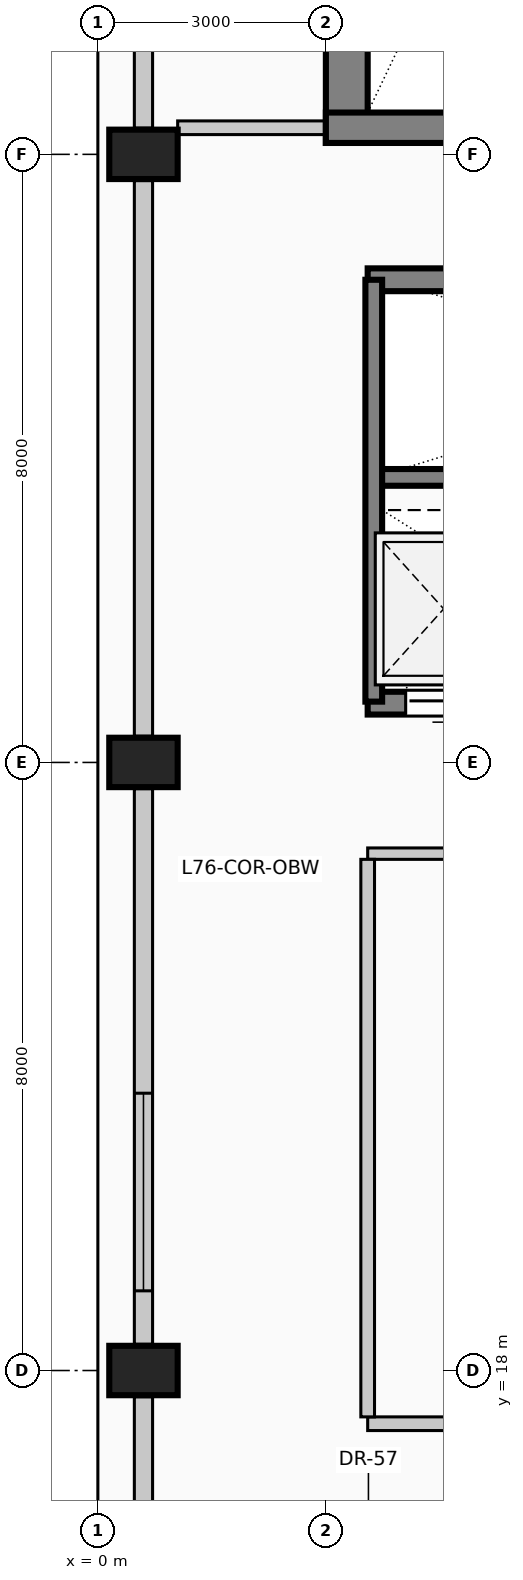
"""IFC4 building model, lengths in metres.
Left out: names, types, materials, properties, quantities, classifications, styles, units other than length and angle.
Written with IfcOpenShell. Run it as: python <this file> out.ifc"""

import sys

from ifc_helpers import new_model, si_unit, direction, frame, frame_2d, origin, origin_2d, place, context, subcontext, project, spatial, rectangle, extrude, element, fill, save


model = new_model("IFC4")
c1 = context("Model", 3, precision=1e-05, world=origin(), true_north=direction((0.0, 1.0)))
c2 = subcontext(c1, "Body", "Model", "MODEL_VIEW")
j1 = project(units=[si_unit("LENGTHUNIT", "METRE"), si_unit("PLANEANGLEUNIT", "RADIAN")], contexts=[c1])
p1 = place(None, origin())
s1 = spatial("IfcSite", under=j1, at=p1, CompositionType="ELEMENT")
p2 = place(p1, origin())
s2 = spatial("IfcBuilding", under=s1, at=p2, CompositionType="ELEMENT")
p3 = place(p2, frame((0.0, 0.0, 313.0)))
s3 = spatial("IfcBuildingStorey", under=s2, at=p3, CompositionType="ELEMENT", Elevation=313.0)
p4 = place(p3, frame((3.275, 34.15, 0.0), z_axis=(0.0, 0.0, 1.0), x_axis=(0.0, 1.0, 0.0)))
e1 = element("IfcWall", 1, at=p4, inside=s3, PredefinedType="SHEAR", context=c2, shape_type="SweptSolid", body=[
    extrude(rectangle(XDim=8.83, YDim=0.55, at=frame_2d((4.415, 0.0))), origin(), (0.0, 0.0, 1.0), 4.8),
])
p5 = place(p3, frame((3.0, 34.35, 0.0), z_axis=(0.0, 0.0, 1.0), x_axis=(1.0, 0.0, 0.0)))
e2 = element("IfcWall", 2, at=p5, inside=s3, PredefinedType="SHEAR", context=c2, shape_type="SweptSolid", body=[
    extrude(rectangle(XDim=4.71, YDim=0.4, at=frame_2d((2.355, 0.0))), origin(), (0.0, 0.0, 1.0), 4.8),
])
p6 = place(p5, frame((2.4, 0.0, 0.0)))
e3 = element("IfcOpeningElement", 3, at=p6, cuts=e2, PredefinedType="OPENING", context=c2, shape_type="SweptSolid", body=[
    extrude(rectangle(XDim=1.15, YDim=2.2, at=frame_2d((0.575, 1.1))), frame((0.0, 0.21, 0.0), z_axis=(0.0, -1.0, 0.0), x_axis=(1.0, 0.0, 0.0)), (0.0, 0.0, 1.0), 0.42),
])
for number, where, z_axis, x_axis in (
    (4, (0.6, 18.0, 0.0), (0.0, 0.0, 1.0), (0.0, 1.0, 0.0)),
    (5, (0.6, 26.0, 0.0), (0.0, 0.0, 1.0), (0.0, 1.0, 0.0)),
    (6, (0.6, 34.0, 0.0), (0.0, 0.0, 1.0), (0.0, 1.0, 0.0)),
):
    element("IfcColumn", number, at=place(p3, frame(where, z_axis=z_axis, x_axis=x_axis)), inside=s3, PredefinedType="COLUMN", context=c2, shape_type="SweptSolid", body=[
        extrude(rectangle(XDim=0.65, YDim=0.9, at=origin_2d()), origin(), (0.0, 0.0, 1.0), 4.8),
    ])
p7 = place(p3, frame((0.6, 10.345, 0.0), z_axis=(0.0, 0.0, 1.0), x_axis=(0.0, 1.0, 0.0)))
e7 = element("IfcWall", 7, at=p7, inside=s3, PredefinedType="SOLIDWALL", context=c2, shape_type="SweptSolid", body=[
    extrude(rectangle(XDim=7.31, YDim=0.24, at=frame_2d((3.655, 0.0))), origin(), (0.0, 0.0, 1.0), 3.71),
])
p8 = place(p7, frame((0.703, 0.0, 0.35)))
e8 = element("IfcOpeningElement", 8, at=p8, cuts=e7, PredefinedType="OPENING", context=c2, shape_type="SweptSolid", body=[
    extrude(rectangle(XDim=2.6, YDim=2.4, at=frame_2d((1.3, 1.2))), frame((0.0, 0.13, 0.0), z_axis=(0.0, -1.0, 0.0), x_axis=(1.0, 0.0, 0.0)), (0.0, 0.0, 1.0), 0.26),
])
p9 = place(p3, frame((0.6, 18.345, 0.0), z_axis=(0.0, 0.0, 1.0), x_axis=(0.0, 1.0, 0.0)))
e9 = element("IfcWall", 9, at=p9, inside=s3, PredefinedType="SOLIDWALL", context=c2, shape_type="SweptSolid", body=[
    extrude(rectangle(XDim=7.31, YDim=0.24, at=frame_2d((3.655, 0.0))), origin(), (0.0, 0.0, 1.0), 3.71),
])
p10 = place(p9, frame((0.703, 0.0, 0.35)))
e10 = element("IfcOpeningElement", 10, at=p10, cuts=e9, PredefinedType="OPENING", context=c2, shape_type="SweptSolid", body=[
    extrude(rectangle(XDim=2.6, YDim=2.4, at=frame_2d((1.3, 1.2))), frame((0.0, 0.13, 0.0), z_axis=(0.0, -1.0, 0.0), x_axis=(1.0, 0.0, 0.0)), (0.0, 0.0, 1.0), 0.26),
])
p11 = place(p3, frame((0.6, 26.345, 0.0), z_axis=(0.0, 0.0, 1.0), x_axis=(0.0, 1.0, 0.0)))
e11 = element("IfcWall", 11, at=p11, inside=s3, PredefinedType="SOLIDWALL", context=c2, shape_type="SweptSolid", body=[
    extrude(rectangle(XDim=7.31, YDim=0.24, at=frame_2d((3.655, 0.0))), origin(), (0.0, 0.0, 1.0), 3.71),
])
p12 = place(p3, frame((0.6, 34.345, 0.0), z_axis=(0.0, 0.0, 1.0), x_axis=(0.0, 1.0, 0.0)))
e12 = element("IfcWall", 12, at=p12, inside=s3, PredefinedType="SOLIDWALL", context=c2, shape_type="SweptSolid", body=[
    extrude(rectangle(XDim=7.71, YDim=0.24, at=frame_2d((3.855, 0.0))), origin(), (0.0, 0.0, 1.0), 3.71),
])
p13 = place(p3, frame((3.55, 32.35, 0.0), z_axis=(0.0, 0.0, 1.0), x_axis=(1.0, 0.0, 0.0)))
e13 = element("IfcWall", 13, at=p13, inside=s3, PredefinedType="SOLIDWALL", context=c2, shape_type="SweptSolid", body=[
    extrude(rectangle(XDim=2.1, YDim=0.3, at=frame_2d((1.05, 0.0))), origin(), (0.0, 0.0, 1.0), 4.8),
])
p14 = place(p3, frame((5.65, 26.78, 0.0), z_axis=(0.0, 0.0, 1.0), x_axis=(-1.0, 0.0, 0.0)))
e14 = element("IfcWall", 14, at=p14, inside=s3, PredefinedType="SOLIDWALL", context=c2, shape_type="SweptSolid", body=[
    extrude(rectangle(XDim=2.1, YDim=0.3, at=frame_2d((1.05, 0.0))), origin(), (0.0, 0.0, 1.0), 4.8),
])
p15 = place(p14, frame((0.5, 0.0, 0.0)))
e15 = element("IfcOpeningElement", 15, at=p15, cuts=e14, PredefinedType="OPENING", context=c2, shape_type="SweptSolid", body=[
    extrude(rectangle(XDim=1.1, YDim=2.2, at=frame_2d((0.55, 1.1))), frame((0.0, 0.16, 0.0), z_axis=(0.0, -1.0, 0.0), x_axis=(1.0, 0.0, 0.0)), (0.0, 0.0, 1.0), 0.32),
])
p16 = place(p3, frame((3.55, 29.75, 0.0), z_axis=(0.0, 0.0, 1.0), x_axis=(1.0, 0.0, 0.0)))
e16 = element("IfcWall", 16, at=p16, inside=s3, PredefinedType="SOLIDWALL", context=c2, shape_type="SweptSolid", body=[
    extrude(rectangle(XDim=8.65, YDim=0.22, at=frame_2d((4.325, 0.0))), origin(), (0.0, 0.0, 1.0), 4.8),
])
p17 = place(p3, frame((3.63, 26.8, 0.0), z_axis=(0.0, 0.0, 1.0), x_axis=(0.0, 1.0, 0.0)))
e17 = element("IfcWall", 17, at=p17, inside=s3, PredefinedType="SOLIDWALL", context=c2, shape_type="SweptSolid", body=[
    extrude(rectangle(XDim=5.55, YDim=0.22, at=frame_2d((2.775, 0.0))), origin(), (0.0, 0.0, 1.0), 4.8),
])
p18 = place(p3, frame((3.55, 17.3, 0.0), z_axis=(0.0, 0.0, 1.0), x_axis=(1.0, 0.0, 0.0)))
e18 = element("IfcWall", 18, at=p18, inside=s3, PredefinedType="PARTITIONING", context=c2, shape_type="SweptSolid", body=[
    extrude(rectangle(XDim=6.25, YDim=0.18, at=frame_2d((3.125, 0.0))), origin(), (0.0, 0.0, 1.0), 4.46),
])
p19 = place(p18, frame((2.65, 0.0, 0.0)))
e19 = element("IfcOpeningElement", 19, at=p19, cuts=e18, PredefinedType="OPENING", context=c2, shape_type="SweptSolid", body=[
    extrude(rectangle(XDim=0.95, YDim=2.15, at=frame_2d((0.475, 1.075))), frame((0.0, 0.1, 0.0), z_axis=(0.0, -1.0, 0.0), x_axis=(1.0, 0.0, 0.0)), (0.0, 0.0, 1.0), 0.2),
])
p20 = place(p3, frame((3.55, 24.8, 0.0), z_axis=(0.0, 0.0, 1.0), x_axis=(1.0, 0.0, 0.0)))
e20 = element("IfcWall", 20, at=p20, inside=s3, PredefinedType="PARTITIONING", context=c2, shape_type="SweptSolid", body=[
    extrude(rectangle(XDim=6.25, YDim=0.15, at=frame_2d((3.125, 0.0))), origin(), (0.0, 0.0, 1.0), 4.46),
])
p21 = place(p3, frame((1.05, 34.35, 0.0), z_axis=(0.0, 0.0, 1.0), x_axis=(1.0, 0.0, 0.0)))
e21 = element("IfcWall", 21, at=p21, inside=s3, PredefinedType="PARTITIONING", context=c2, shape_type="SweptSolid", body=[
    extrude(rectangle(XDim=1.95, YDim=0.18, at=frame_2d((0.975, 0.0))), origin(), (0.0, 0.0, 1.0), 4.46),
])
p22 = place(p3, frame((3.55, 17.39, 0.0), z_axis=(0.0, 0.0, 1.0), x_axis=(0.0, 1.0, 0.0)))
e22 = element("IfcWall", 22, at=p22, inside=s3, PredefinedType="PARTITIONING", context=c2, shape_type="SweptSolid", body=[
    extrude(rectangle(XDim=7.335, YDim=0.18, at=frame_2d((3.667, 0.0))), origin(), (0.0, 0.0, 1.0), 4.46),
])
p23 = place(p10, origin())
e23 = element("IfcWindow", 23, at=p23, inside=s3, PartitioningType="SINGLE_PANEL", PredefinedType="WINDOW", context=c2, shape_type="SweptSolid", body=[
    extrude(rectangle(XDim=2.6, YDim=2.4, at=frame_2d((1.3, 1.2))), frame((0.0, 0.03, 0.0), z_axis=(0.0, -1.0, 0.0), x_axis=(1.0, 0.0, 0.0)), (0.0, 0.0, 1.0), 0.06),
])
fill(e10, e23)
p24 = place(p15, origin())
e24 = element("IfcDoor", 24, at=p24, inside=s3, OperationType="SLIDING_TO_LEFT", PredefinedType="DOOR", context=c2, shape_type="SweptSolid", body=[
    extrude(rectangle(XDim=1.1, YDim=2.2, at=frame_2d((0.55, 1.1))), frame((0.0, 0.025, 0.0), z_axis=(0.0, -1.0, 0.0), x_axis=(1.0, 0.0, 0.0)), (0.0, 0.0, 1.0), 0.05),
])
fill(e15, e24)
save(model, sys.argv[1])
